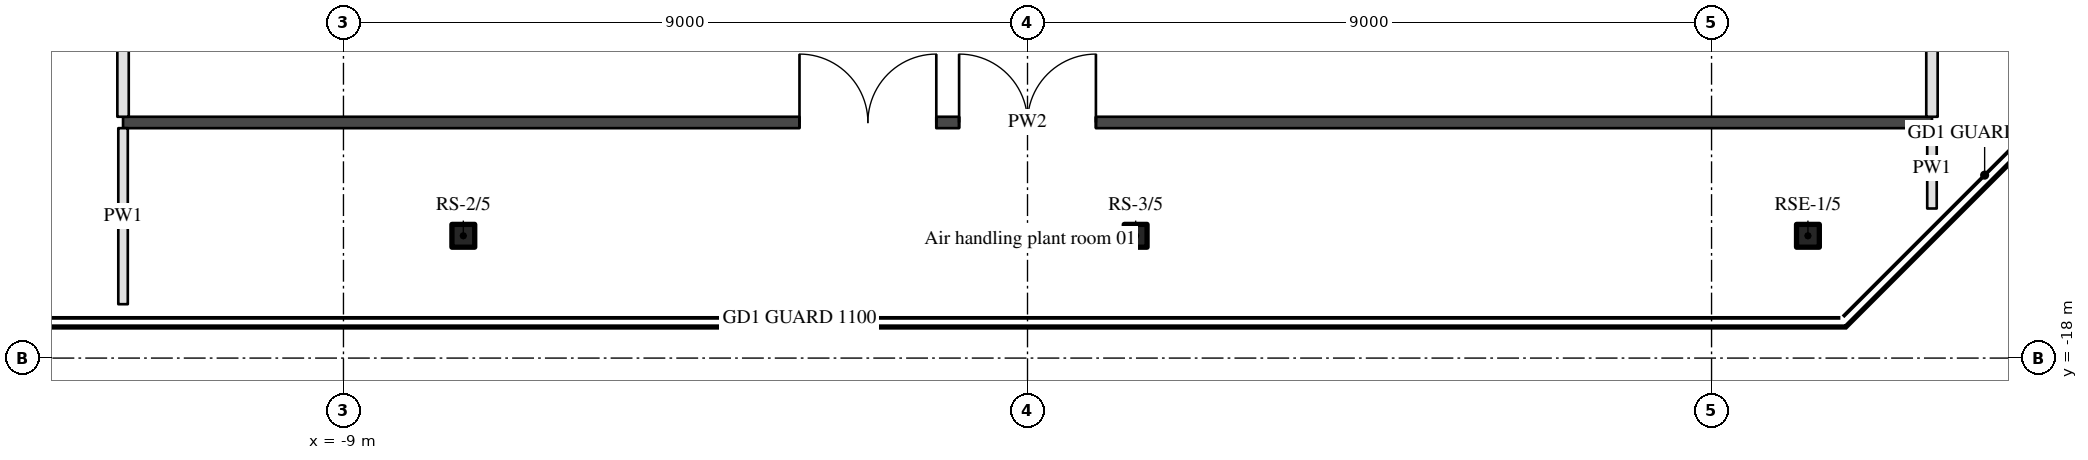
"""IFC4 building model, lengths in metres.
Left out: names, types, materials, properties, quantities, classifications, styles, units other than length and angle.
Written with IfcOpenShell. Run it as: python <this file> out.ifc"""

import sys

from ifc_helpers import new_model, si_unit, direction, frame, frame_2d, origin, origin_2d, place, context, subcontext, project, spatial, rectangle, hollow_rectangle, extrude, element, fill, save


model = new_model("IFC4")
c1 = context("Model", 3, precision=1e-05, world=origin(), true_north=direction((0.0, 1.0)))
c2 = subcontext(c1, "Body", "Model", "MODEL_VIEW")
j1 = project(units=[si_unit("LENGTHUNIT", "METRE"), si_unit("PLANEANGLEUNIT", "RADIAN")], contexts=[c1])
p1 = place(None, origin())
s1 = spatial("IfcSite", under=j1, at=p1, CompositionType="ELEMENT")
p2 = place(p1, origin())
s2 = spatial("IfcBuilding", under=s1, at=p2, CompositionType="ELEMENT")
p3 = place(p2, frame((0.0, 0.0, 255.0)))
s3 = spatial("IfcBuildingStorey", under=s2, at=p3, CompositionType="ELEMENT", Elevation=255.0)
for number, where, z_axis, x_axis in (
    (1, (-7.423, -16.391, 0.0), (0.0, 0.0, 1.0), (1.0, 0.0, 0.0)),
    (2, (1.423, -16.391, 0.0), (0.0, 0.0, 1.0), (1.0, 0.0, 0.0)),
    (3, (10.268, -16.391, 0.0), (0.0, 0.0, 1.0), (1.0, 0.0, 0.0)),
):
    element("IfcColumn", number, at=place(p3, frame(where, z_axis=z_axis, x_axis=x_axis)), inside=s3, PredefinedType="COLUMN", context=c2, shape_type="SweptSolid", body=[
        extrude(hollow_rectangle(XDim=0.3, YDim=0.3, WallThickness=0.02, InnerFilletRadius=0.03, OuterFilletRadius=0.05, at=origin_2d()), origin(), (0.0, 0.0, 1.0), 4.08),
    ])
p4 = place(p3, frame((-11.9, -14.9, 0.0), z_axis=(0.0, 0.0, 1.0), x_axis=(1.0, 0.0, 0.0)))
e4 = element("IfcWall", 4, at=p4, inside=s3, PredefinedType="PARTITIONING", context=c2, shape_type="SweptSolid", body=[
    extrude(rectangle(XDim=23.8, YDim=0.15, at=frame_2d((11.9, 0.0))), origin(), (0.0, 0.0, 1.0), 3.08),
])
p5 = place(p4, frame((11.0, 0.0, 0.0)))
e5 = element("IfcOpeningElement", 5, at=p5, cuts=e4, PredefinedType="OPENING", context=c2, shape_type="SweptSolid", body=[
    extrude(rectangle(XDim=1.8, YDim=2.1, at=frame_2d((0.9, 1.05))), frame((0.0, 0.085, 0.0), z_axis=(0.0, -1.0, 0.0), x_axis=(1.0, 0.0, 0.0)), (0.0, 0.0, 1.0), 0.17),
])
p6 = place(p4, frame((8.9, 0.0, 0.0)))
e6 = element("IfcOpeningElement", 6, at=p6, cuts=e4, PredefinedType="OPENING", context=c2, shape_type="SweptSolid", body=[
    extrude(rectangle(XDim=1.8, YDim=2.1, at=frame_2d((0.9, 1.05))), frame((0.0, 0.085, 0.0), z_axis=(0.0, -1.0, 0.0), x_axis=(1.0, 0.0, 0.0)), (0.0, 0.0, 1.0), 0.17),
])
p7 = place(p3, frame((-11.9, -17.291, 0.0), z_axis=(0.0, 0.0, 1.0), x_axis=(0.0, 1.0, 0.0)))
e7 = element("IfcWall", 7, at=p7, inside=s3, PredefinedType="PARTITIONING", context=c2, shape_type="SweptSolid", body=[
    extrude(rectangle(XDim=2.316, YDim=0.125, at=frame_2d((1.158, 0.0))), origin(), (0.0, 0.0, 1.0), 3.56),
])
p8 = place(p3, frame((-11.9, 8.35, 0.0), z_axis=(0.0, 0.0, 1.0), x_axis=(0.0, -1.0, 0.0)))
e8 = element("IfcWall", 8, at=p8, inside=s3, PredefinedType="PARTITIONING", context=c2, shape_type="SweptSolid", body=[
    extrude(rectangle(XDim=23.175, YDim=0.15, at=frame_2d((11.587, 0.0))), origin(), (0.0, 0.0, 1.0), 3.56),
])
p9 = place(p8, frame((12.163, 0.0, 0.0)))
e9 = element("IfcOpeningElement", 9, at=p9, cuts=e8, PredefinedType="OPENING", context=c2, shape_type="SweptSolid", body=[
    extrude(rectangle(XDim=1.8, YDim=2.1, at=frame_2d((0.9, 1.05))), frame((0.0, 0.085, 0.0), z_axis=(0.0, -1.0, 0.0), x_axis=(1.0, 0.0, 0.0)), (0.0, 0.0, 1.0), 0.17),
])
p10 = place(p8, frame((8.725, 0.0, 0.0)))
e10 = element("IfcOpeningElement", 10, at=p10, cuts=e8, PredefinedType="OPENING", context=c2, shape_type="SweptSolid", body=[
    extrude(rectangle(XDim=1.8, YDim=2.1, at=frame_2d((0.9, 1.05))), frame((0.0, 0.085, 0.0), z_axis=(0.0, -1.0, 0.0), x_axis=(1.0, 0.0, 0.0)), (0.0, 0.0, 1.0), 0.17),
])
p11 = place(p3, frame((11.9, -16.032, 0.0), z_axis=(0.0, 0.0, 1.0), x_axis=(0.0, 1.0, 0.0)))
e11 = element("IfcWall", 11, at=p11, inside=s3, PredefinedType="PARTITIONING", context=c2, shape_type="SweptSolid", body=[
    extrude(rectangle(XDim=1.057, YDim=0.125, at=frame_2d((0.528, 0.0))), origin(), (0.0, 0.0, 1.0), 3.56),
])
p12 = place(p3, frame((11.9, -14.825, 0.0), z_axis=(0.0, 0.0, 1.0), x_axis=(0.0, 1.0, 0.0)))
e12 = element("IfcWall", 12, at=p12, inside=s3, PredefinedType="PARTITIONING", context=c2, shape_type="SweptSolid", body=[
    extrude(rectangle(XDim=20.15, YDim=0.15, at=frame_2d((10.075, 0.0))), origin(), (0.0, 0.0, 1.0), 3.56),
])
p13 = place(p12, frame((9.475, 0.0, 0.0)))
e13 = element("IfcOpeningElement", 13, at=p13, cuts=e12, PredefinedType="OPENING", context=c2, shape_type="SweptSolid", body=[
    extrude(rectangle(XDim=1.8, YDim=2.1, at=frame_2d((0.9, 1.05))), frame((0.0, 0.085, 0.0), z_axis=(0.0, -1.0, 0.0), x_axis=(1.0, 0.0, 0.0)), (0.0, 0.0, 1.0), 0.17),
])
p14 = place(p12, frame((12.95, 0.0, 0.0)))
e14 = element("IfcOpeningElement", 14, at=p14, cuts=e12, PredefinedType="OPENING", context=c2, shape_type="SweptSolid", body=[
    extrude(rectangle(XDim=1.8, YDim=2.1, at=frame_2d((0.9, 1.05))), frame((0.0, 0.085, 0.0), z_axis=(0.0, -1.0, 0.0), x_axis=(1.0, 0.0, 0.0)), (0.0, 0.0, 1.0), 0.17),
])
p15 = place(p5, origin())
e15 = element("IfcDoor", 15, at=p15, inside=s3, OperationType="DOUBLE_DOOR_SINGLE_SWING", PredefinedType="DOOR", context=c2, shape_type="SweptSolid", body=[
    extrude(rectangle(XDim=1.8, YDim=2.1, at=frame_2d((0.9, 1.05))), frame((0.0, 0.025, 0.0), z_axis=(0.0, -1.0, 0.0), x_axis=(1.0, 0.0, 0.0)), (0.0, 0.0, 1.0), 0.05),
])
fill(e5, e15)
p16 = place(p6, origin())
e16 = element("IfcDoor", 16, at=p16, inside=s3, OperationType="DOUBLE_DOOR_SINGLE_SWING", PredefinedType="DOOR", context=c2, shape_type="SweptSolid", body=[
    extrude(rectangle(XDim=1.8, YDim=2.1, at=frame_2d((0.9, 1.05))), frame((0.0, 0.025, 0.0), z_axis=(0.0, -1.0, 0.0), x_axis=(1.0, 0.0, 0.0)), (0.0, 0.0, 1.0), 0.05),
])
fill(e6, e16)
save(model, sys.argv[1])
